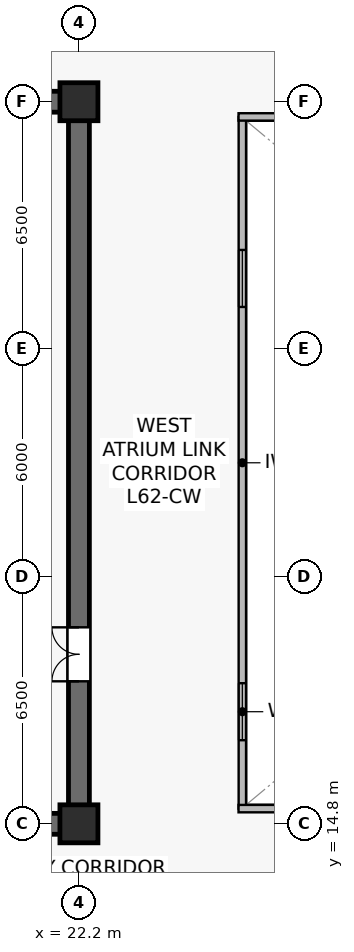
"""IFC4 building model, lengths in metres.
Left out: names, types, materials, properties, quantities, classifications, styles, units other than length and angle.
Written with IfcOpenShell. Run it as: python <this file> out.ifc"""

import sys

from ifc_helpers import new_model, si_unit, direction, frame, frame_2d, origin, origin_2d, place, context, subcontext, project, spatial, rectangle, extrude, source, transform, mapped, element, fill, save


model = new_model("IFC4")
c1 = context("Model", 3, precision=1e-05, world=origin(), true_north=direction((0.0, 1.0)))
c2 = subcontext(c1, "Body", "Model", "MODEL_VIEW")
j1 = project(units=[si_unit("LENGTHUNIT", "METRE"), si_unit("PLANEANGLEUNIT", "RADIAN")], contexts=[c1])
p1 = place(None, origin())
s1 = spatial("IfcSite", under=j1, at=p1, CompositionType="ELEMENT")
p2 = place(p1, origin())
s2 = spatial("IfcBuilding", under=s1, at=p2, CompositionType="ELEMENT")
p3 = place(p2, frame((0.0, 0.0, 258.8)))
s3 = spatial("IfcBuildingStorey", under=s2, at=p3, CompositionType="ELEMENT", Elevation=258.8)
p4 = place(p3, frame((7.125, 14.8, 0.0), z_axis=(0.0, 0.0, 1.0), x_axis=(1.0, 0.0, 0.0)))
e1 = element("IfcWall", 1, at=p4, inside=s3, PredefinedType="SHEAR", context=c2, shape_type="SweptSolid", body=[
    extrude(rectangle(XDim=15.35, YDim=0.55, at=frame_2d((7.675, 0.0))), origin(), (0.0, 0.0, 1.0), 3.8),
])
p5 = place(p3, frame((7.125, 33.8, 0.0), z_axis=(0.0, 0.0, 1.0), x_axis=(1.0, 0.0, 0.0)))
e2 = element("IfcWall", 2, at=p5, inside=s3, PredefinedType="SHEAR", context=c2, shape_type="SweptSolid", body=[
    extrude(rectangle(XDim=15.35, YDim=0.55, at=frame_2d((7.675, 0.0))), origin(), (0.0, 0.0, 1.0), 3.8),
])
p6 = place(p5, frame((5.2, 0.0, 0.0)))
e3 = element("IfcOpeningElement", 3, at=p6, cuts=e2, PredefinedType="OPENING", context=c2, shape_type="SweptSolid", body=[
    extrude(rectangle(XDim=0.95, YDim=2.15, at=frame_2d((0.475, 1.075))), frame((0.0, 0.285, 0.0), z_axis=(0.0, -1.0, 0.0), x_axis=(1.0, 0.0, 0.0)), (0.0, 0.0, 1.0), 0.57),
])
p7 = place(p5, frame((7.715, 0.0, 0.0)))
e4 = element("IfcOpeningElement", 4, at=p7, cuts=e2, PredefinedType="OPENING", context=c2, shape_type="SweptSolid", body=[
    extrude(rectangle(XDim=0.95, YDim=2.15, at=frame_2d((0.475, 1.075))), frame((0.0, 0.285, 0.0), z_axis=(0.0, -1.0, 0.0), x_axis=(1.0, 0.0, 0.0)), (0.0, 0.0, 1.0), 0.57),
])
p8 = place(p5, frame((10.265, 0.0, 0.0)))
e5 = element("IfcOpeningElement", 5, at=p8, cuts=e2, PredefinedType="OPENING", context=c2, shape_type="SweptSolid", body=[
    extrude(rectangle(XDim=0.95, YDim=2.15, at=frame_2d((0.475, 1.075))), frame((0.0, 0.285, 0.0), z_axis=(0.0, -1.0, 0.0), x_axis=(1.0, 0.0, 0.0)), (0.0, 0.0, 1.0), 0.57),
])
p9 = place(p5, frame((12.815, 0.0, 0.0)))
e6 = element("IfcOpeningElement", 6, at=p9, cuts=e2, PredefinedType="OPENING", context=c2, shape_type="SweptSolid", body=[
    extrude(rectangle(XDim=0.95, YDim=2.15, at=frame_2d((0.475, 1.075))), frame((0.0, 0.285, 0.0), z_axis=(0.0, -1.0, 0.0), x_axis=(1.0, 0.0, 0.0)), (0.0, 0.0, 1.0), 0.57),
])
p10 = place(p3, frame((22.2, 15.075, 0.0), z_axis=(0.0, 0.0, 1.0), x_axis=(0.0, 1.0, 0.0)))
e7 = element("IfcWall", 7, at=p10, inside=s3, PredefinedType="SHEAR", context=c2, shape_type="SweptSolid", body=[
    extrude(rectangle(XDim=18.45, YDim=0.55, at=frame_2d((9.225, 0.0))), origin(), (0.0, 0.0, 1.0), 3.8),
])
p11 = place(p10, frame((3.475, 0.0, 0.0)))
e8 = element("IfcOpeningElement", 8, at=p11, cuts=e7, PredefinedType="OPENING", context=c2, shape_type="SweptSolid", body=[
    extrude(rectangle(XDim=1.42, YDim=2.2, at=frame_2d((0.71, 1.1))), frame((0.0, 0.285, 0.0), z_axis=(0.0, -1.0, 0.0), x_axis=(1.0, 0.0, 0.0)), (0.0, 0.0, 1.0), 0.57),
])
m1 = source(origin(), c2, "Body", "SweptSolid", [
    extrude(rectangle(XDim=1.0, YDim=1.0, at=origin_2d()), origin(), (0.0, 0.0, 1.0), 4.1),
])
for number, where, z_axis, x_axis in (
    (9, (22.2, 14.8, 0.0), (0.0, 0.0, 1.0), (1.0, 0.0, 0.0)),
    (10, (22.2, 33.8, 0.0), (0.0, 0.0, 1.0), (1.0, 0.0, 0.0)),
):
    element("IfcColumn", number, at=place(p3, frame(where, z_axis=z_axis, x_axis=x_axis)), inside=s3, PredefinedType="COLUMN", context=c2, shape_type="MappedRepresentation", body=[
        mapped(m1, transform((0.0, 0.0, 0.0), scale=1.0)),
    ])
p12 = place(p3, frame((26.5, 15.2, 0.0), z_axis=(0.0, 0.0, 1.0), x_axis=(0.0, 1.0, 0.0)))
e11 = element("IfcWall", 11, at=p12, inside=s3, PredefinedType="SOLIDWALL", context=c2, shape_type="SweptSolid", body=[
    extrude(rectangle(XDim=18.2, YDim=0.195, at=frame_2d((9.1, 0.0))), origin(), (0.0, 0.0, 1.0), 3.8),
])
p13 = place(p12, frame((1.8, 0.0, 0.9)))
e12 = element("IfcOpeningElement", 12, at=p13, cuts=e11, PredefinedType="OPENING", context=c2, shape_type="SweptSolid", body=[
    extrude(rectangle(XDim=1.5, YDim=1.4, at=frame_2d((0.75, 0.7))), frame((0.0, 0.107, 0.0), z_axis=(0.0, -1.0, 0.0), x_axis=(1.0, 0.0, 0.0)), (0.0, 0.0, 1.0), 0.215),
])
p14 = place(p12, frame((13.2, 0.0, 0.9)))
e13 = element("IfcOpeningElement", 13, at=p14, cuts=e11, PredefinedType="OPENING", context=c2, shape_type="SweptSolid", body=[
    extrude(rectangle(XDim=1.5, YDim=1.4, at=frame_2d((0.75, 0.7))), frame((0.0, 0.107, 0.0), z_axis=(0.0, -1.0, 0.0), x_axis=(1.0, 0.0, 0.0)), (0.0, 0.0, 1.0), 0.215),
])
for number, where, z_axis, x_axis in (
    (14, (26.4, 15.2, 0.0), (0.0, 0.0, 1.0), (1.0, 0.0, 0.0)),
    (15, (26.4, 33.4, 0.0), (0.0, 0.0, 1.0), (1.0, 0.0, 0.0)),
):
    element("IfcWall", number, at=place(p3, frame(where, z_axis=z_axis, x_axis=x_axis)), inside=s3, PredefinedType="SOLIDWALL", context=c2, shape_type="SweptSolid", body=[
        extrude(rectangle(XDim=22.0, YDim=0.195, at=frame_2d((11.0, 0.0))), origin(), (0.0, 0.0, 1.0), 3.8),
    ])
m2 = source(origin(), c2, "Body", "SweptSolid", [
    extrude(rectangle(XDim=1.5, YDim=1.4, at=frame_2d((0.75, 0.7))), frame((0.0, 0.03, 0.0), z_axis=(0.0, -1.0, 0.0), x_axis=(1.0, 0.0, 0.0)), (0.0, 0.0, 1.0), 0.06),
])
p15 = place(p13, origin())
e16 = element("IfcWindow", 16, at=p15, inside=s3, PartitioningType="SINGLE_PANEL", PredefinedType="WINDOW", context=c2, shape_type="MappedRepresentation", body=[
    mapped(m2, transform((0.0, 0.0, 0.0), scale=1.0)),
])
fill(e12, e16)
p16 = place(p14, origin())
e17 = element("IfcWindow", 17, at=p16, inside=s3, PartitioningType="SINGLE_PANEL", PredefinedType="WINDOW", context=c2, shape_type="MappedRepresentation", body=[
    mapped(m2, transform((0.0, 0.0, 0.0), scale=1.0)),
])
fill(e13, e17)
m3 = source(origin(), c2, "Body", "SweptSolid", [
    extrude(rectangle(XDim=1.42, YDim=2.2, at=frame_2d((0.71, 1.1))), frame((0.0, 0.025, 0.0), z_axis=(0.0, -1.0, 0.0), x_axis=(1.0, 0.0, 0.0)), (0.0, 0.0, 1.0), 0.05),
])
p17 = place(p11, origin())
e18 = element("IfcDoor", 18, at=p17, inside=s3, OperationType="DOUBLE_DOOR_SINGLE_SWING", PredefinedType="DOOR", context=c2, shape_type="MappedRepresentation", body=[
    mapped(m3, transform((0.0, 0.0, 0.0), scale=1.0)),
])
fill(e8, e18)
save(model, sys.argv[1])
